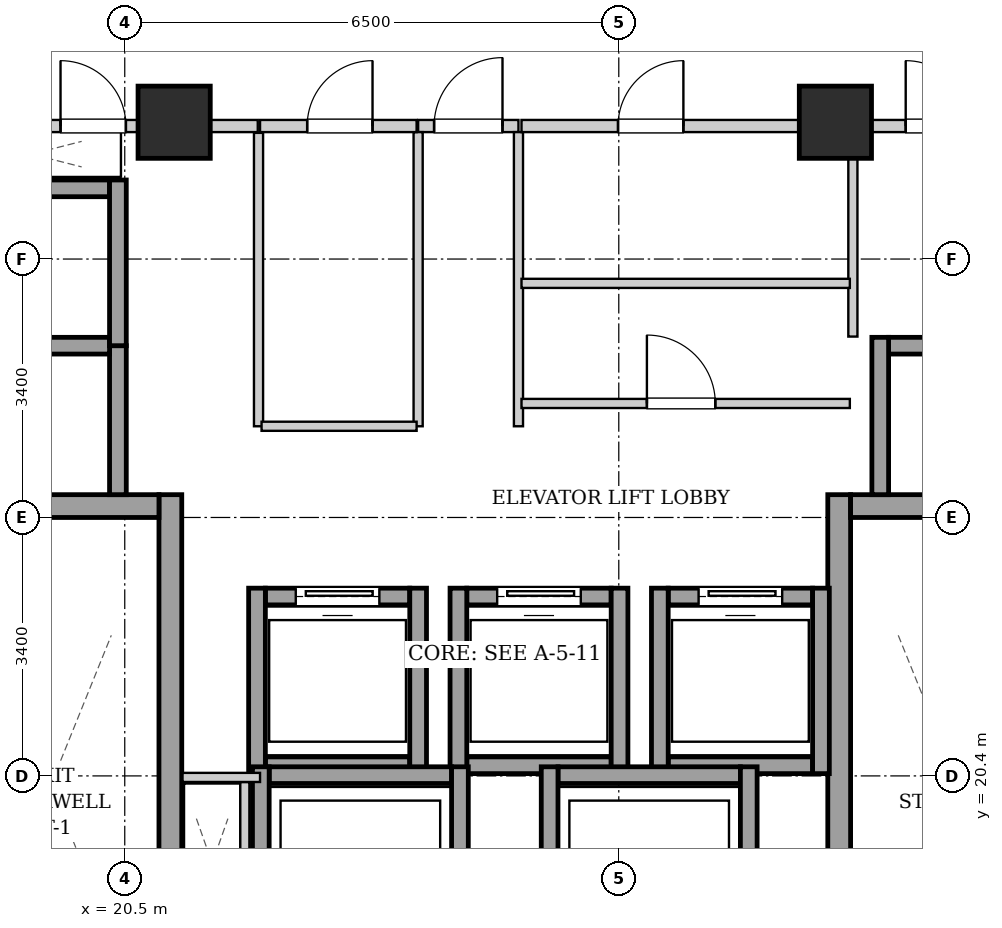
"""IFC4 building model, lengths in metres.
Left out: names, types, materials, properties, quantities, classifications, styles, units other than length and angle.
Written with IfcOpenShell. Run it as: python <this file> out.ifc"""

import sys

from ifc_helpers import new_model, si_unit, direction, frame, frame_2d, origin, origin_2d, place, context, subcontext, project, spatial, rectangle, extrude, element, fill, save


model = new_model("IFC4")
c1 = context("Model", 3, precision=1e-05, world=origin(), true_north=direction((0.0, 1.0)))
c2 = subcontext(c1, "Body", "Model", "MODEL_VIEW")
j1 = project(units=[si_unit("LENGTHUNIT", "METRE"), si_unit("PLANEANGLEUNIT", "RADIAN")], contexts=[c1])
p1 = place(None, origin())
s1 = spatial("IfcSite", under=j1, at=p1, CompositionType="ELEMENT")
p2 = place(p1, origin())
s2 = spatial("IfcBuilding", under=s1, at=p2, CompositionType="ELEMENT")
p3 = place(p2, frame((0.0, 0.0, 130.9)))
s3 = spatial("IfcBuildingStorey", under=s2, at=p3, CompositionType="ELEMENT", Elevation=130.9)
for number, where, z_axis, x_axis in (
    (1, (21.15, 29.0, 0.0), (0.0, 0.0, 1.0), (1.0, 0.0, 0.0)),
    (2, (29.85, 29.0, 0.0), (0.0, 0.0, 1.0), (1.0, 0.0, 0.0)),
):
    element("IfcColumn", number, at=place(p3, frame(where, z_axis=z_axis, x_axis=x_axis)), inside=s3, PredefinedType="COLUMN", context=c2, shape_type="SweptSolid", body=[
        extrude(rectangle(XDim=0.95, YDim=0.95, at=origin_2d()), origin(), (0.0, 0.0, 1.0), 3.25),
    ])
p4 = place(p3, frame((21.1, 15.1, 0.0), z_axis=(0.0, 0.0, 1.0), x_axis=(0.0, 1.0, 0.0)))
e3 = element("IfcWall", 3, at=p4, inside=s3, PredefinedType="SHEAR", context=c2, shape_type="SweptSolid", body=[
    extrude(rectangle(XDim=9.0, YDim=0.3, at=frame_2d((4.5, 0.0))), origin(), (0.0, 0.0, 1.0), 2.99),
])
p5 = place(p3, frame((18.1, 23.95, 0.0), z_axis=(0.0, 0.0, 1.0), x_axis=(1.0, 0.0, 0.0)))
e4 = element("IfcWall", 4, at=p5, inside=s3, PredefinedType="SHEAR", context=c2, shape_type="SweptSolid", body=[
    extrude(rectangle(XDim=2.85, YDim=0.3, at=frame_2d((1.425, 0.0))), origin(), (0.0, 0.0, 1.0), 2.99),
])
p6 = place(p3, frame((29.9, 15.1, 0.0), z_axis=(0.0, 0.0, 1.0), x_axis=(0.0, 1.0, 0.0)))
e5 = element("IfcWall", 5, at=p6, inside=s3, PredefinedType="SHEAR", context=c2, shape_type="SweptSolid", body=[
    extrude(rectangle(XDim=9.0, YDim=0.3, at=frame_2d((4.5, 0.0))), origin(), (0.0, 0.0, 1.0), 2.99),
])
p7 = place(p3, frame((30.05, 23.95, 0.0), z_axis=(0.0, 0.0, 1.0), x_axis=(1.0, 0.0, 0.0)))
e6 = element("IfcWall", 6, at=p7, inside=s3, PredefinedType="SHEAR", context=c2, shape_type="SweptSolid", body=[
    extrude(rectangle(XDim=2.85, YDim=0.3, at=frame_2d((1.425, 0.0))), origin(), (0.0, 0.0, 1.0), 2.99),
])
p8 = place(p3, frame((22.35, 20.54, 0.0), z_axis=(0.0, 0.0, 1.0), x_axis=(1.0, 0.0, 0.0)))
e7 = element("IfcWall", 7, at=p8, inside=s3, PredefinedType="SHEAR", context=c2, shape_type="SweptSolid", body=[
    extrude(rectangle(XDim=1.9, YDim=0.22, at=frame_2d((0.95, 0.0))), origin(), (0.0, 0.0, 1.0), 2.99),
])
p9 = place(p3, frame((22.35, 22.76, 0.0), z_axis=(0.0, 0.0, 1.0), x_axis=(1.0, 0.0, 0.0)))
e8 = element("IfcWall", 8, at=p9, inside=s3, PredefinedType="SHEAR", context=c2, shape_type="SweptSolid", body=[
    extrude(rectangle(XDim=1.9, YDim=0.22, at=frame_2d((0.95, 0.0))), origin(), (0.0, 0.0, 1.0), 2.99),
])
p10 = place(p9, frame((0.4, 0.0, 0.0)))
e9 = element("IfcOpeningElement", 9, at=p10, cuts=e8, PredefinedType="OPENING", context=c2, shape_type="SweptSolid", body=[
    extrude(rectangle(XDim=1.1, YDim=2.15, at=frame_2d((0.55, 1.075))), frame((0.0, 0.12, 0.0), z_axis=(0.0, -1.0, 0.0), x_axis=(1.0, 0.0, 0.0)), (0.0, 0.0, 1.0), 0.24),
])
for number, where, z_axis, x_axis in (
    (10, (22.24, 20.43, 0.0), (0.0, 0.0, 1.0), (0.0, 1.0, 0.0)),
    (11, (24.36, 20.43, 0.0), (0.0, 0.0, 1.0), (0.0, 1.0, 0.0)),
):
    element("IfcWall", number, at=place(p3, frame(where, z_axis=z_axis, x_axis=x_axis)), inside=s3, PredefinedType="SHEAR", context=c2, shape_type="SweptSolid", body=[
        extrude(rectangle(XDim=2.44, YDim=0.22, at=frame_2d((1.22, 0.0))), origin(), (0.0, 0.0, 1.0), 2.99),
    ])
p11 = place(p3, frame((25.0, 20.54, 0.0), z_axis=(0.0, 0.0, 1.0), x_axis=(1.0, 0.0, 0.0)))
e12 = element("IfcWall", 12, at=p11, inside=s3, PredefinedType="SHEAR", context=c2, shape_type="SweptSolid", body=[
    extrude(rectangle(XDim=1.9, YDim=0.22, at=frame_2d((0.95, 0.0))), origin(), (0.0, 0.0, 1.0), 2.99),
])
p12 = place(p3, frame((25.0, 22.76, 0.0), z_axis=(0.0, 0.0, 1.0), x_axis=(1.0, 0.0, 0.0)))
e13 = element("IfcWall", 13, at=p12, inside=s3, PredefinedType="SHEAR", context=c2, shape_type="SweptSolid", body=[
    extrude(rectangle(XDim=1.9, YDim=0.22, at=frame_2d((0.95, 0.0))), origin(), (0.0, 0.0, 1.0), 2.99),
])
p13 = place(p12, frame((0.4, 0.0, 0.0)))
e14 = element("IfcOpeningElement", 14, at=p13, cuts=e13, PredefinedType="OPENING", context=c2, shape_type="SweptSolid", body=[
    extrude(rectangle(XDim=1.1, YDim=2.15, at=frame_2d((0.55, 1.075))), frame((0.0, 0.12, 0.0), z_axis=(0.0, -1.0, 0.0), x_axis=(1.0, 0.0, 0.0)), (0.0, 0.0, 1.0), 0.24),
])
for number, where, z_axis, x_axis in (
    (15, (24.89, 20.43, 0.0), (0.0, 0.0, 1.0), (0.0, 1.0, 0.0)),
    (16, (27.01, 20.43, 0.0), (0.0, 0.0, 1.0), (0.0, 1.0, 0.0)),
):
    element("IfcWall", number, at=place(p3, frame(where, z_axis=z_axis, x_axis=x_axis)), inside=s3, PredefinedType="SHEAR", context=c2, shape_type="SweptSolid", body=[
        extrude(rectangle(XDim=2.44, YDim=0.22, at=frame_2d((1.22, 0.0))), origin(), (0.0, 0.0, 1.0), 2.99),
    ])
p14 = place(p3, frame((27.65, 20.54, 0.0), z_axis=(0.0, 0.0, 1.0), x_axis=(1.0, 0.0, 0.0)))
e17 = element("IfcWall", 17, at=p14, inside=s3, PredefinedType="SHEAR", context=c2, shape_type="SweptSolid", body=[
    extrude(rectangle(XDim=1.9, YDim=0.22, at=frame_2d((0.95, 0.0))), origin(), (0.0, 0.0, 1.0), 2.99),
])
p15 = place(p3, frame((27.65, 22.76, 0.0), z_axis=(0.0, 0.0, 1.0), x_axis=(1.0, 0.0, 0.0)))
e18 = element("IfcWall", 18, at=p15, inside=s3, PredefinedType="SHEAR", context=c2, shape_type="SweptSolid", body=[
    extrude(rectangle(XDim=1.9, YDim=0.22, at=frame_2d((0.95, 0.0))), origin(), (0.0, 0.0, 1.0), 2.99),
])
p16 = place(p15, frame((0.4, 0.0, 0.0)))
e19 = element("IfcOpeningElement", 19, at=p16, cuts=e18, PredefinedType="OPENING", context=c2, shape_type="SweptSolid", body=[
    extrude(rectangle(XDim=1.1, YDim=2.15, at=frame_2d((0.55, 1.075))), frame((0.0, 0.12, 0.0), z_axis=(0.0, -1.0, 0.0), x_axis=(1.0, 0.0, 0.0)), (0.0, 0.0, 1.0), 0.24),
])
for number, where, z_axis, x_axis in (
    (20, (27.54, 20.43, 0.0), (0.0, 0.0, 1.0), (0.0, 1.0, 0.0)),
    (21, (29.66, 20.43, 0.0), (0.0, 0.0, 1.0), (0.0, 1.0, 0.0)),
):
    element("IfcWall", number, at=place(p3, frame(where, z_axis=z_axis, x_axis=x_axis)), inside=s3, PredefinedType="SHEAR", context=c2, shape_type="SweptSolid", body=[
        extrude(rectangle(XDim=2.44, YDim=0.22, at=frame_2d((1.22, 0.0))), origin(), (0.0, 0.0, 1.0), 2.99),
    ])
p17 = place(p3, frame((20.41, 24.1, 0.0), z_axis=(0.0, 0.0, 1.0), x_axis=(0.0, 1.0, 0.0)))
e22 = element("IfcWall", 22, at=p17, inside=s3, PredefinedType="SHEAR", context=c2, shape_type="SweptSolid", body=[
    extrude(rectangle(XDim=1.96, YDim=0.22, at=frame_2d((0.98, 0.0))), origin(), (0.0, 0.0, 1.0), 2.99),
])
for number, where, z_axis, x_axis in (
    (23, (18.4, 26.06, 0.0), (0.0, 0.0, 1.0), (1.0, 0.0, 0.0)),
    (24, (18.4, 28.13, 0.0), (0.0, 0.0, 1.0), (1.0, 0.0, 0.0)),
):
    element("IfcWall", number, at=place(p3, frame(where, z_axis=z_axis, x_axis=x_axis)), inside=s3, PredefinedType="SHEAR", context=c2, shape_type="SweptSolid", body=[
        extrude(rectangle(XDim=1.9, YDim=0.22, at=frame_2d((0.95, 0.0))), origin(), (0.0, 0.0, 1.0), 2.99),
    ])
p18 = place(p3, frame((20.41, 26.06, 0.0), z_axis=(0.0, 0.0, 1.0), x_axis=(0.0, 1.0, 0.0)))
e25 = element("IfcWall", 25, at=p18, inside=s3, PredefinedType="SHEAR", context=c2, shape_type="SweptSolid", body=[
    extrude(rectangle(XDim=2.18, YDim=0.22, at=frame_2d((1.09, 0.0))), origin(), (0.0, 0.0, 1.0), 2.99),
])
p19 = place(p3, frame((30.55, 26.06, 0.0), z_axis=(0.0, 0.0, 1.0), x_axis=(1.0, 0.0, 0.0)))
e26 = element("IfcWall", 26, at=p19, inside=s3, PredefinedType="SHEAR", context=c2, shape_type="SweptSolid", body=[
    extrude(rectangle(XDim=1.9, YDim=0.22, at=frame_2d((0.95, 0.0))), origin(), (0.0, 0.0, 1.0), 2.99),
])
p20 = place(p3, frame((30.44, 24.1, 0.0), z_axis=(0.0, 0.0, 1.0), x_axis=(0.0, 1.0, 0.0)))
e27 = element("IfcWall", 27, at=p20, inside=s3, PredefinedType="SHEAR", context=c2, shape_type="SweptSolid", body=[
    extrude(rectangle(XDim=2.07, YDim=0.22, at=frame_2d((1.035, 0.0))), origin(), (0.0, 0.0, 1.0), 2.99),
])
p21 = place(p3, frame((22.4, 20.41, 0.0), z_axis=(0.0, 0.0, 1.0), x_axis=(1.0, 0.0, 0.0)))
e28 = element("IfcWall", 28, at=p21, inside=s3, PredefinedType="SHEAR", context=c2, shape_type="SweptSolid", body=[
    extrude(rectangle(XDim=2.4, YDim=0.22, at=frame_2d((1.2, 0.0))), origin(), (0.0, 0.0, 1.0), 2.99),
])
for number, where, z_axis, x_axis in (
    (29, (22.29, 17.98, 0.0), (0.0, 0.0, 1.0), (0.0, 1.0, 0.0)),
    (30, (24.91, 17.98, 0.0), (0.0, 0.0, 1.0), (0.0, 1.0, 0.0)),
):
    element("IfcWall", number, at=place(p3, frame(where, z_axis=z_axis, x_axis=x_axis)), inside=s3, PredefinedType="SHEAR", context=c2, shape_type="SweptSolid", body=[
        extrude(rectangle(XDim=2.54, YDim=0.22, at=frame_2d((1.27, 0.0))), origin(), (0.0, 0.0, 1.0), 2.99),
    ])
p22 = place(p3, frame((26.2, 20.41, 0.0), z_axis=(0.0, 0.0, 1.0), x_axis=(1.0, 0.0, 0.0)))
e31 = element("IfcWall", 31, at=p22, inside=s3, PredefinedType="SHEAR", context=c2, shape_type="SweptSolid", body=[
    extrude(rectangle(XDim=2.4, YDim=0.22, at=frame_2d((1.2, 0.0))), origin(), (0.0, 0.0, 1.0), 2.99),
])
for number, where, z_axis, x_axis in (
    (32, (26.09, 17.98, 0.0), (0.0, 0.0, 1.0), (0.0, 1.0, 0.0)),
    (33, (28.71, 17.98, 0.0), (0.0, 0.0, 1.0), (0.0, 1.0, 0.0)),
):
    element("IfcWall", number, at=place(p3, frame(where, z_axis=z_axis, x_axis=x_axis)), inside=s3, PredefinedType="SHEAR", context=c2, shape_type="SweptSolid", body=[
        extrude(rectangle(XDim=2.54, YDim=0.22, at=frame_2d((1.27, 0.0))), origin(), (0.0, 0.0, 1.0), 2.99),
    ])
p23 = place(p3, frame((24.36, 28.95, 0.0), z_axis=(0.0, 0.0, 1.0), x_axis=(1.0, 0.0, 0.0)))
e34 = element("IfcWall", 34, at=p23, inside=s3, PredefinedType="PARTITIONING", context=c2, shape_type="SweptSolid", body=[
    extrude(rectangle(XDim=1.32, YDim=0.16, at=frame_2d((0.66, 0.0))), origin(), (0.0, 0.0, 1.0), 2.426),
])
p24 = place(p23, frame((0.21, 0.0, 0.0)))
e35 = element("IfcOpeningElement", 35, at=p24, cuts=e34, PredefinedType="OPENING", context=c2, shape_type="SweptSolid", body=[
    extrude(rectangle(XDim=0.9, YDim=2.05, at=frame_2d((0.45, 1.025))), frame((0.0, 0.09, 0.0), z_axis=(0.0, -1.0, 0.0), x_axis=(1.0, 0.0, 0.0)), (0.0, 0.0, 1.0), 0.18),
])
p25 = place(p3, frame((17.96, 28.95, 0.0), z_axis=(0.0, 0.0, 1.0), x_axis=(1.0, 0.0, 0.0)))
e36 = element("IfcWall", 36, at=p25, inside=s3, PredefinedType="PARTITIONING", context=c2, shape_type="SweptSolid", body=[
    extrude(rectangle(XDim=4.29, YDim=0.16, at=frame_2d((2.145, 0.0))), origin(), (0.0, 0.0, 1.0), 2.426),
])
p26 = place(p25, frame((1.695, 0.0, 0.0)))
e37 = element("IfcOpeningElement", 37, at=p26, cuts=e36, PredefinedType="OPENING", context=c2, shape_type="SweptSolid", body=[
    extrude(rectangle(XDim=0.86, YDim=2.05, at=frame_2d((0.43, 1.025))), frame((0.0, 0.09, 0.0), z_axis=(0.0, -1.0, 0.0), x_axis=(1.0, 0.0, 0.0)), (0.0, 0.0, 1.0), 0.18),
])
p27 = place(p3, frame((22.08, 18.2, 0.0), z_axis=(0.0, 0.0, 1.0), x_axis=(0.0, 1.0, 0.0)))
e38 = element("IfcWall", 38, at=p27, inside=s3, PredefinedType="PARTITIONING", context=c2, shape_type="SweptSolid", body=[
    extrude(rectangle(XDim=2.12, YDim=0.12, at=frame_2d((1.06, 0.0))), origin(), (0.0, 0.0, 1.0), 2.99),
])
p28 = place(p3, frame((22.28, 20.38, 0.0), z_axis=(0.0, 0.0, 1.0), x_axis=(-1.0, 0.0, 0.0)))
e39 = element("IfcWall", 39, at=p28, inside=s3, PredefinedType="PARTITIONING", context=c2, shape_type="SweptSolid", body=[
    extrude(rectangle(XDim=1.02, YDim=0.12, at=frame_2d((0.51, 0.0))), origin(), (0.0, 0.0, 1.0), 2.99),
])
for number, where, z_axis, x_axis in (
    (40, (24.36, 25.0, 0.0), (0.0, 0.0, 1.0), (0.0, 1.0, 0.0)),
    (41, (25.68, 25.0, 0.0), (0.0, 0.0, 1.0), (0.0, 1.0, 0.0)),
):
    element("IfcWall", number, at=place(p3, frame(where, z_axis=z_axis, x_axis=x_axis)), inside=s3, PredefinedType="PARTITIONING", context=c2, shape_type="SweptSolid", body=[
        extrude(rectangle(XDim=3.87, YDim=0.12, at=frame_2d((1.935, 0.0))), origin(), (0.0, 0.0, 1.0), 2.99),
    ])
p29 = place(p3, frame((30.08, 26.18, 0.0), z_axis=(0.0, 0.0, 1.0), x_axis=(0.0, 1.0, 0.0)))
e42 = element("IfcWall", 42, at=p29, inside=s3, PredefinedType="PARTITIONING", context=c2, shape_type="SweptSolid", body=[
    extrude(rectangle(XDim=2.68, YDim=0.12, at=frame_2d((1.34, 0.0))), origin(), (0.0, 0.0, 1.0), 2.99),
])
p30 = place(p3, frame((30.08, 28.95, 0.0), z_axis=(0.0, 0.0, 1.0), x_axis=(1.0, 0.0, 0.0)))
e43 = element("IfcWall", 43, at=p30, inside=s3, PredefinedType="PARTITIONING", context=c2, shape_type="SweptSolid", body=[
    extrude(rectangle(XDim=2.96, YDim=0.16, at=frame_2d((1.48, 0.0))), origin(), (0.0, 0.0, 1.0), 2.99),
])
p31 = place(p30, frame((0.695, 0.0, 0.0)))
e44 = element("IfcOpeningElement", 44, at=p31, cuts=e43, PredefinedType="OPENING", context=c2, shape_type="SweptSolid", body=[
    extrude(rectangle(XDim=0.86, YDim=2.05, at=frame_2d((0.43, 1.025))), frame((0.0, 0.09, 0.0), z_axis=(0.0, -1.0, 0.0), x_axis=(1.0, 0.0, 0.0)), (0.0, 0.0, 1.0), 0.18),
])
p32 = place(p3, frame((22.26, 25.0, 0.0), z_axis=(0.0, 0.0, 1.0), x_axis=(0.0, 1.0, 0.0)))
e45 = element("IfcWall", 45, at=p32, inside=s3, PredefinedType="PARTITIONING", context=c2, shape_type="SweptSolid", body=[
    extrude(rectangle(XDim=3.86, YDim=0.12, at=frame_2d((1.93, 0.0))), origin(), (0.0, 0.0, 1.0), 2.99),
])
p33 = place(p3, frame((22.3, 25.0, 0.0), z_axis=(0.0, 0.0, 1.0), x_axis=(1.0, 0.0, 0.0)))
e46 = element("IfcWall", 46, at=p33, inside=s3, PredefinedType="PARTITIONING", context=c2, shape_type="SweptSolid", body=[
    extrude(rectangle(XDim=2.04, YDim=0.12, at=frame_2d((1.02, 0.0))), origin(), (0.0, 0.0, 1.0), 2.99),
])
p34 = place(p3, frame((22.28, 28.95, 0.0), z_axis=(0.0, 0.0, 1.0), x_axis=(1.0, 0.0, 0.0)))
e47 = element("IfcWall", 47, at=p34, inside=s3, PredefinedType="PARTITIONING", context=c2, shape_type="SweptSolid", body=[
    extrude(rectangle(XDim=2.06, YDim=0.16, at=frame_2d((1.03, 0.0))), origin(), (0.0, 0.0, 1.0), 2.426),
])
p35 = place(p34, frame((0.62, 0.0, 0.0)))
e48 = element("IfcOpeningElement", 48, at=p35, cuts=e47, PredefinedType="OPENING", context=c2, shape_type="SweptSolid", body=[
    extrude(rectangle(XDim=0.86, YDim=2.05, at=frame_2d((0.43, 1.025))), frame((0.0, 0.09, 0.0), z_axis=(0.0, -1.0, 0.0), x_axis=(1.0, 0.0, 0.0)), (0.0, 0.0, 1.0), 0.18),
])
p36 = place(p3, frame((25.72, 26.88, 0.0), z_axis=(0.0, 0.0, 1.0), x_axis=(1.0, 0.0, 0.0)))
e49 = element("IfcWall", 49, at=p36, inside=s3, PredefinedType="PARTITIONING", context=c2, shape_type="SweptSolid", body=[
    extrude(rectangle(XDim=4.32, YDim=0.12, at=frame_2d((2.16, 0.0))), origin(), (0.0, 0.0, 1.0), 2.99),
])
p37 = place(p3, frame((25.72, 25.3, 0.0), z_axis=(0.0, 0.0, 1.0), x_axis=(1.0, 0.0, 0.0)))
e50 = element("IfcWall", 50, at=p37, inside=s3, PredefinedType="PARTITIONING", context=c2, shape_type="SweptSolid", body=[
    extrude(rectangle(XDim=4.32, YDim=0.12, at=frame_2d((2.16, 0.0))), origin(), (0.0, 0.0, 1.0), 2.99),
])
p38 = place(p37, frame((1.65, 0.0, 0.0)))
e51 = element("IfcOpeningElement", 51, at=p38, cuts=e50, PredefinedType="OPENING", context=c2, shape_type="SweptSolid", body=[
    extrude(rectangle(XDim=0.9, YDim=2.05, at=frame_2d((0.45, 1.025))), frame((0.0, 0.07, 0.0), z_axis=(0.0, -1.0, 0.0), x_axis=(1.0, 0.0, 0.0)), (0.0, 0.0, 1.0), 0.14),
])
p39 = place(p3, frame((25.72, 28.95, 0.0), z_axis=(0.0, 0.0, 1.0), x_axis=(1.0, 0.0, 0.0)))
e52 = element("IfcWall", 52, at=p39, inside=s3, PredefinedType="PARTITIONING", context=c2, shape_type="SweptSolid", body=[
    extrude(rectangle(XDim=4.32, YDim=0.16, at=frame_2d((2.16, 0.0))), origin(), (0.0, 0.0, 1.0), 2.426),
])
p40 = place(p39, frame((1.27, 0.0, 0.0)))
e53 = element("IfcOpeningElement", 53, at=p40, cuts=e52, PredefinedType="OPENING", context=c2, shape_type="SweptSolid", body=[
    extrude(rectangle(XDim=0.86, YDim=2.05, at=frame_2d((0.43, 1.025))), frame((0.0, 0.09, 0.0), z_axis=(0.0, -1.0, 0.0), x_axis=(1.0, 0.0, 0.0)), (0.0, 0.0, 1.0), 0.18),
])
p41 = place(p10, origin())
e54 = element("IfcDoor", 54, at=p41, inside=s3, OperationType="SLIDING_TO_LEFT", PredefinedType="DOOR", context=c2, shape_type="SweptSolid", body=[
    extrude(rectangle(XDim=1.1, YDim=2.15, at=frame_2d((0.55, 1.075))), frame((0.0, 0.025, 0.0), z_axis=(0.0, -1.0, 0.0), x_axis=(1.0, 0.0, 0.0)), (0.0, 0.0, 1.0), 0.05),
])
fill(e9, e54)
p42 = place(p13, origin())
e55 = element("IfcDoor", 55, at=p42, inside=s3, OperationType="SLIDING_TO_LEFT", PredefinedType="DOOR", context=c2, shape_type="SweptSolid", body=[
    extrude(rectangle(XDim=1.1, YDim=2.15, at=frame_2d((0.55, 1.075))), frame((0.0, 0.025, 0.0), z_axis=(0.0, -1.0, 0.0), x_axis=(1.0, 0.0, 0.0)), (0.0, 0.0, 1.0), 0.05),
])
fill(e14, e55)
p43 = place(p16, origin())
e56 = element("IfcDoor", 56, at=p43, inside=s3, OperationType="SLIDING_TO_LEFT", PredefinedType="DOOR", context=c2, shape_type="SweptSolid", body=[
    extrude(rectangle(XDim=1.1, YDim=2.15, at=frame_2d((0.55, 1.075))), frame((0.0, 0.025, 0.0), z_axis=(0.0, -1.0, 0.0), x_axis=(1.0, 0.0, 0.0)), (0.0, 0.0, 1.0), 0.05),
])
fill(e19, e56)
p44 = place(p24, origin())
e57 = element("IfcDoor", 57, at=p44, inside=s3, OperationType="SINGLE_SWING_RIGHT", PredefinedType="DOOR", context=c2, shape_type="SweptSolid", body=[
    extrude(rectangle(XDim=0.9, YDim=2.05, at=frame_2d((0.45, 1.025))), frame((0.0, 0.025, 0.0), z_axis=(0.0, -1.0, 0.0), x_axis=(1.0, 0.0, 0.0)), (0.0, 0.0, 1.0), 0.05),
])
fill(e35, e57)
p45 = place(p26, origin())
e58 = element("IfcDoor", 58, at=p45, inside=s3, OperationType="SINGLE_SWING_LEFT", PredefinedType="DOOR", context=c2, shape_type="SweptSolid", body=[
    extrude(rectangle(XDim=0.86, YDim=2.05, at=frame_2d((0.43, 1.025))), frame((0.0, 0.025, 0.0), z_axis=(0.0, -1.0, 0.0), x_axis=(1.0, 0.0, 0.0)), (0.0, 0.0, 1.0), 0.05),
])
fill(e37, e58)
p46 = place(p31, origin())
e59 = element("IfcDoor", 59, at=p46, inside=s3, OperationType="SINGLE_SWING_LEFT", PredefinedType="DOOR", context=c2, shape_type="SweptSolid", body=[
    extrude(rectangle(XDim=0.86, YDim=2.05, at=frame_2d((0.43, 1.025))), frame((0.0, 0.025, 0.0), z_axis=(0.0, -1.0, 0.0), x_axis=(1.0, 0.0, 0.0)), (0.0, 0.0, 1.0), 0.05),
])
fill(e44, e59)
p47 = place(p35, origin())
e60 = element("IfcDoor", 60, at=p47, inside=s3, OperationType="SINGLE_SWING_RIGHT", PredefinedType="DOOR", context=c2, shape_type="SweptSolid", body=[
    extrude(rectangle(XDim=0.86, YDim=2.05, at=frame_2d((0.43, 1.025))), frame((0.0, 0.025, 0.0), z_axis=(0.0, -1.0, 0.0), x_axis=(1.0, 0.0, 0.0)), (0.0, 0.0, 1.0), 0.05),
])
fill(e48, e60)
p48 = place(p38, origin())
e61 = element("IfcDoor", 61, at=p48, inside=s3, OperationType="SINGLE_SWING_LEFT", PredefinedType="DOOR", context=c2, shape_type="SweptSolid", body=[
    extrude(rectangle(XDim=0.9, YDim=2.05, at=frame_2d((0.45, 1.025))), frame((0.0, 0.025, 0.0), z_axis=(0.0, -1.0, 0.0), x_axis=(1.0, 0.0, 0.0)), (0.0, 0.0, 1.0), 0.05),
])
fill(e51, e61)
p49 = place(p40, origin())
e62 = element("IfcDoor", 62, at=p49, inside=s3, OperationType="SINGLE_SWING_RIGHT", PredefinedType="DOOR", context=c2, shape_type="SweptSolid", body=[
    extrude(rectangle(XDim=0.86, YDim=2.05, at=frame_2d((0.43, 1.025))), frame((0.0, 0.025, 0.0), z_axis=(0.0, -1.0, 0.0), x_axis=(1.0, 0.0, 0.0)), (0.0, 0.0, 1.0), 0.05),
])
fill(e53, e62)
save(model, sys.argv[1])
